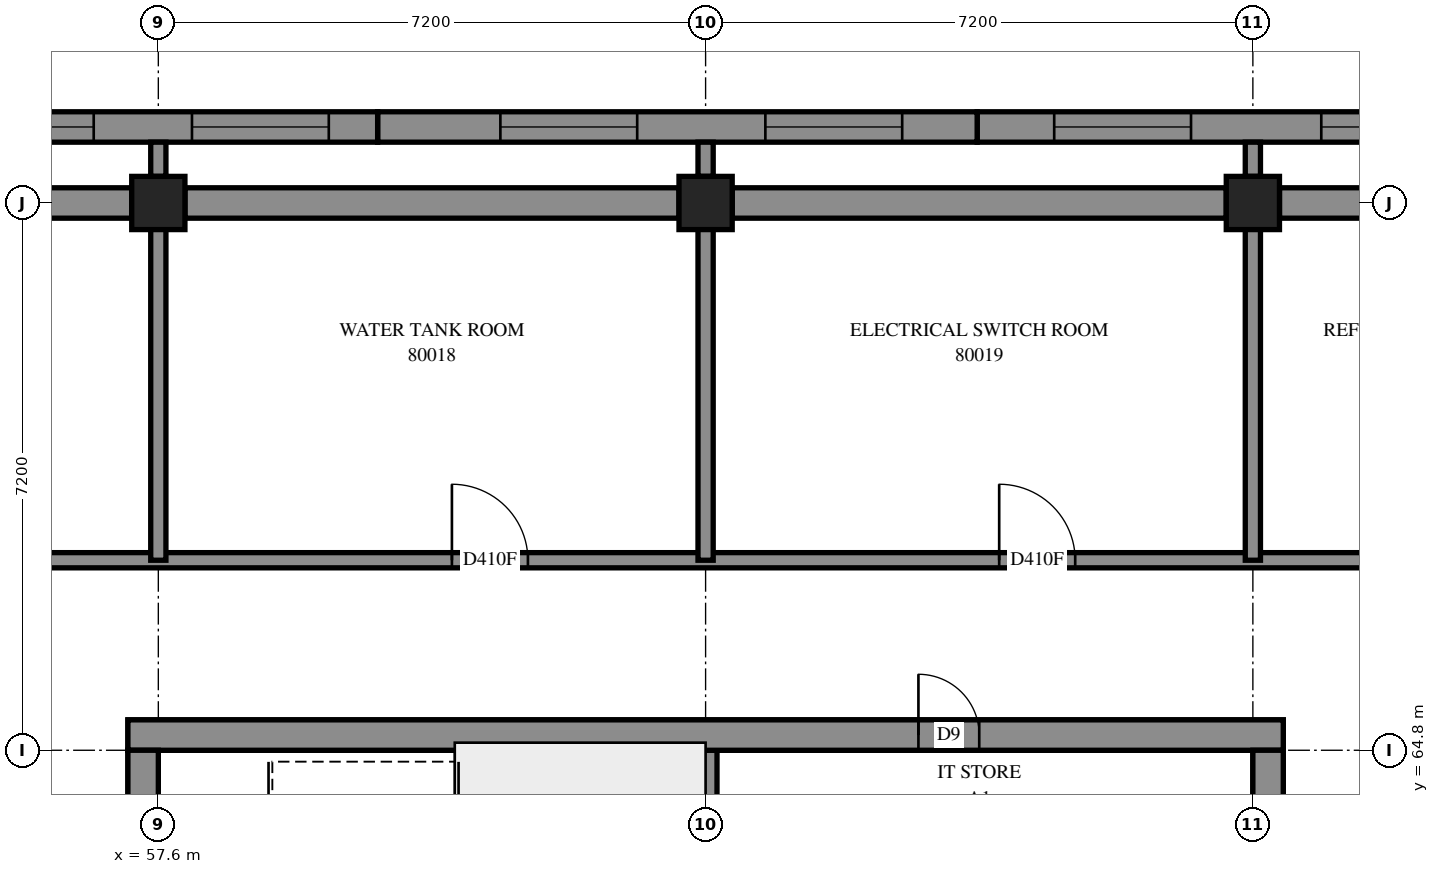
"""IFC4 building model, lengths in metres.
Left out: names, types, materials, properties, quantities, classifications, styles, units other than length and angle.
Written with IfcOpenShell. Run it as: python <this file> out.ifc"""

import sys

from ifc_helpers import new_model, si_unit, direction, frame, frame_2d, origin, origin_2d, place, context, subcontext, project, spatial, polyline, rectangle, outline, extrude, element, fill, save


model = new_model("IFC4")
c1 = context("Model", 3, precision=1e-05, world=origin(), true_north=direction((0.0, 1.0)))
c2 = subcontext(c1, "Body", "Model", "MODEL_VIEW")
j1 = project(units=[si_unit("LENGTHUNIT", "METRE"), si_unit("PLANEANGLEUNIT", "RADIAN")], contexts=[c1])
p1 = place(None, origin())
s1 = spatial("IfcSite", under=j1, at=p1, CompositionType="ELEMENT")
p2 = place(p1, origin())
s2 = spatial("IfcBuilding", under=s1, at=p2, CompositionType="ELEMENT")
p3 = place(p2, frame((0.0, 0.0, 294.4)))
s3 = spatial("IfcBuildingStorey", under=s2, at=p3, CompositionType="ELEMENT", Elevation=294.4)
for number, where, z_axis, x_axis in (
    (1, (57.6, 72.0, 0.0), (0.0, 0.0, 1.0), (1.0, 0.0, 0.0)),
    (2, (64.8, 72.0, 0.0), (0.0, 0.0, 1.0), (1.0, 0.0, 0.0)),
    (3, (72.0, 72.0, 0.0), (0.0, 0.0, 1.0), (1.0, 0.0, 0.0)),
):
    element("IfcColumn", number, at=place(p3, frame(where, z_axis=z_axis, x_axis=x_axis)), inside=s3, PredefinedType="COLUMN", context=c2, shape_type="SweptSolid", body=[
        extrude(rectangle(XDim=0.7, YDim=0.7, at=origin_2d()), origin(), (0.0, 0.0, 1.0), 3.5),
    ])
p4 = place(p3, frame((57.2, 65.0, -0.3), z_axis=(0.0, 0.0, 1.0), x_axis=(1.0, 0.0, 0.0)))
e4 = element("IfcWall", 4, at=p4, inside=s3, PredefinedType="SHEAR", context=c2, shape_type="SweptSolid", body=[
    extrude(outline(polyline([(0.0, 0.0), (15.2, 0.0), (15.2, 3.1), (0.0, 3.1), (0.0, 0.0)])), frame((0.0, 0.2, 0.0), z_axis=(0.0, -1.0, 0.0), x_axis=(1.0, 0.0, 0.0)), (0.0, 0.0, 1.0), 0.4),
])
p5 = place(p4, frame((10.4, 0.0, 0.3)))
e5 = element("IfcOpeningElement", 5, at=p5, cuts=e4, PredefinedType="OPENING", context=c2, shape_type="SweptSolid", body=[
    extrude(rectangle(XDim=0.8, YDim=2.1, at=frame_2d((0.4, 1.05))), frame((0.0, 0.21, 0.0), z_axis=(0.0, -1.0, 0.0), x_axis=(1.0, 0.0, 0.0)), (0.0, 0.0, 1.0), 0.42),
])
p6 = place(p3, frame((57.4, 50.4, -0.3), z_axis=(0.0, 0.0, 1.0), x_axis=(0.0, 1.0, 0.0)))
e6 = element("IfcWall", 6, at=p6, inside=s3, PredefinedType="SHEAR", context=c2, shape_type="SweptSolid", body=[
    extrude(outline(polyline([(0.0, 0.0), (14.4, 0.0), (14.4, 3.1), (0.0, 3.1), (0.0, 0.0)])), frame((0.0, 0.2, 0.0), z_axis=(0.0, -1.0, 0.0), x_axis=(1.0, 0.0, 0.0)), (0.0, 0.0, 1.0), 0.4),
])
p7 = place(p6, frame((11.35, 0.0, 0.3)))
e7 = element("IfcOpeningElement", 7, at=p7, cuts=e6, PredefinedType="OPENING", context=c2, shape_type="SweptSolid", body=[
    extrude(rectangle(XDim=1.1, YDim=2.1, at=frame_2d((0.55, 1.05))), frame((0.0, 0.21, 0.0), z_axis=(0.0, -1.0, 0.0), x_axis=(1.0, 0.0, 0.0)), (0.0, 0.0, 1.0), 0.42),
])
p8 = place(p3, frame((72.2, 50.4, -0.3), z_axis=(0.0, 0.0, 1.0), x_axis=(0.0, 1.0, 0.0)))
e8 = element("IfcWall", 8, at=p8, inside=s3, PredefinedType="SHEAR", context=c2, shape_type="SweptSolid", body=[
    extrude(outline(polyline([(0.0, 0.0), (14.4, 0.0), (14.4, 3.1), (0.0, 3.1), (0.0, 0.0)])), frame((0.0, 0.2, 0.0), z_axis=(0.0, -1.0, 0.0), x_axis=(1.0, 0.0, 0.0)), (0.0, 0.0, 1.0), 0.4),
])
p9 = place(p8, frame((4.55, 0.0, 0.3)))
e9 = element("IfcOpeningElement", 9, at=p9, cuts=e8, PredefinedType="OPENING", context=c2, shape_type="SweptSolid", body=[
    extrude(rectangle(XDim=1.1, YDim=2.1, at=frame_2d((0.55, 1.05))), frame((0.0, 0.21, 0.0), z_axis=(0.0, -1.0, 0.0), x_axis=(1.0, 0.0, 0.0)), (0.0, 0.0, 1.0), 0.42),
])
p10 = place(p8, frame((11.35, 0.0, 0.3)))
e10 = element("IfcOpeningElement", 10, at=p10, cuts=e8, PredefinedType="OPENING", context=c2, shape_type="SweptSolid", body=[
    extrude(rectangle(XDim=1.1, YDim=2.1, at=frame_2d((0.55, 1.05))), frame((0.0, 0.21, 0.0), z_axis=(0.0, -1.0, 0.0), x_axis=(1.0, 0.0, 0.0)), (0.0, 0.0, 1.0), 0.42),
])
p11 = place(p3, frame((64.8, 60.6, 0.0), z_axis=(0.0, 0.0, 1.0), x_axis=(0.0, 1.0, 0.0)))
e11 = element("IfcWall", 11, at=p11, inside=s3, PredefinedType="SOLIDWALL", context=c2, shape_type="SweptSolid", body=[
    extrude(outline(polyline([(0.0, 0.0), (4.2, 0.0), (4.2, 3.5), (0.0, 3.5), (0.0, 0.0)])), frame((0.0, 0.15, 0.0), z_axis=(0.0, -1.0, 0.0), x_axis=(1.0, 0.0, 0.0)), (0.0, 0.0, 1.0), 0.3),
])
p12 = place(p3, frame((76.29, 73.0, 0.0), z_axis=(0.0, 0.0, 1.0), x_axis=(-1.0, 0.0, 0.0)))
e12 = element("IfcWall", 12, at=p12, inside=s3, PredefinedType="SOLIDWALL", context=c2, shape_type="SweptSolid", body=[
    extrude(outline(polyline([(0.03, -0.2), (7.918, -0.2), (7.918, 0.2), (-0.03, 0.2), (0.03, -0.2)])), origin(), (0.0, 0.0, 1.0), 3.5),
])
p13 = place(p12, frame((1.591, 0.0, 0.7)))
e13 = element("IfcOpeningElement", 13, at=p13, cuts=e12, PredefinedType="OPENING", context=c2, shape_type="SweptSolid", body=[
    extrude(rectangle(XDim=1.8, YDim=2.2, at=frame_2d((0.9, 1.1))), frame((0.0, 0.21, 0.0), z_axis=(0.0, -1.0, 0.0), x_axis=(1.0, 0.0, 0.0)), (0.0, 0.0, 1.0), 0.42),
])
p14 = place(p12, frame((5.104, 0.0, 0.7)))
e14 = element("IfcOpeningElement", 14, at=p14, cuts=e12, PredefinedType="OPENING", context=c2, shape_type="SweptSolid", body=[
    extrude(rectangle(XDim=1.8, YDim=2.2, at=frame_2d((0.9, 1.1))), frame((0.0, 0.21, 0.0), z_axis=(0.0, -1.0, 0.0), x_axis=(1.0, 0.0, 0.0)), (0.0, 0.0, 1.0), 0.42),
])
p15 = place(p3, frame((68.373, 73.0, 0.0), z_axis=(0.0, 0.0, 1.0), x_axis=(-1.0, 0.0, 0.0)))
e15 = element("IfcWall", 15, at=p15, inside=s3, PredefinedType="SOLIDWALL", context=c2, shape_type="SweptSolid", body=[
    extrude(outline(polyline([(0.0, -0.2), (7.887, -0.2), (7.887, 0.2), (0.0, 0.2), (0.0, -0.2)])), origin(), (0.0, 0.0, 1.0), 3.5),
])
p16 = place(p15, frame((0.986, 0.0, 0.7)))
e16 = element("IfcOpeningElement", 16, at=p16, cuts=e15, PredefinedType="OPENING", context=c2, shape_type="SweptSolid", body=[
    extrude(rectangle(XDim=1.8, YDim=2.2, at=frame_2d((0.9, 1.1))), frame((0.0, 0.21, 0.0), z_axis=(0.0, -1.0, 0.0), x_axis=(1.0, 0.0, 0.0)), (0.0, 0.0, 1.0), 0.42),
])
p17 = place(p15, frame((4.473, 0.0, 0.7)))
e17 = element("IfcOpeningElement", 17, at=p17, cuts=e15, PredefinedType="OPENING", context=c2, shape_type="SweptSolid", body=[
    extrude(rectangle(XDim=1.8, YDim=2.2, at=frame_2d((0.9, 1.1))), frame((0.0, 0.21, 0.0), z_axis=(0.0, -1.0, 0.0), x_axis=(1.0, 0.0, 0.0)), (0.0, 0.0, 1.0), 0.42),
])
p18 = place(p3, frame((60.485, 73.0, 0.0), z_axis=(0.0, 0.0, 1.0), x_axis=(-1.0, 0.0, 0.0)))
e18 = element("IfcWall", 18, at=p18, inside=s3, PredefinedType="SOLIDWALL", context=c2, shape_type="SweptSolid", body=[
    extrude(outline(polyline([(0.0, -0.2), (7.887, -0.2), (7.887, 0.2), (0.0, 0.2), (0.0, -0.2)])), origin(), (0.0, 0.0, 1.0), 3.5),
])
p19 = place(p18, frame((0.643, 0.0, 0.7)))
e19 = element("IfcOpeningElement", 19, at=p19, cuts=e18, PredefinedType="OPENING", context=c2, shape_type="SweptSolid", body=[
    extrude(rectangle(XDim=1.8, YDim=2.2, at=frame_2d((0.9, 1.1))), frame((0.0, 0.21, 0.0), z_axis=(0.0, -1.0, 0.0), x_axis=(1.0, 0.0, 0.0)), (0.0, 0.0, 1.0), 0.42),
])
p20 = place(p18, frame((3.735, 0.0, 0.7)))
e20 = element("IfcOpeningElement", 20, at=p20, cuts=e18, PredefinedType="OPENING", context=c2, shape_type="SweptSolid", body=[
    extrude(rectangle(XDim=1.8, YDim=2.2, at=frame_2d((0.9, 1.1))), frame((0.0, 0.21, 0.0), z_axis=(0.0, -1.0, 0.0), x_axis=(1.0, 0.0, 0.0)), (0.0, 0.0, 1.0), 0.42),
])
p21 = place(p3, frame((55.102, 67.3, 0.0), z_axis=(0.0, 0.0, 1.0), x_axis=(1.0, 0.0, 0.0)))
e21 = element("IfcWall", 21, at=p21, inside=s3, PredefinedType="PARTITIONING", context=c2, shape_type="SweptSolid", body=[
    extrude(rectangle(XDim=19.398, YDim=0.2, at=frame_2d((9.699, 0.0))), origin(), (0.0, 0.0, 1.0), 3.5),
])
p22 = place(p21, frame((6.361, 0.0, 0.0)))
e22 = element("IfcOpeningElement", 22, at=p22, cuts=e21, PredefinedType="OPENING", context=c2, shape_type="SweptSolid", body=[
    extrude(rectangle(XDim=1.0, YDim=2.1, at=frame_2d((0.5, 1.05))), frame((0.0, 0.11, 0.0), z_axis=(0.0, -1.0, 0.0), x_axis=(1.0, 0.0, 0.0)), (0.0, 0.0, 1.0), 0.22),
])
p23 = place(p21, frame((13.56, 0.0, 0.0)))
e23 = element("IfcOpeningElement", 23, at=p23, cuts=e21, PredefinedType="OPENING", context=c2, shape_type="SweptSolid", body=[
    extrude(rectangle(XDim=1.0, YDim=2.1, at=frame_2d((0.5, 1.05))), frame((0.0, 0.11, 0.0), z_axis=(0.0, -1.0, 0.0), x_axis=(1.0, 0.0, 0.0)), (0.0, 0.0, 1.0), 0.22),
])
for number, where, z_axis, x_axis in (
    (24, (57.6, 67.3, 0.0), (0.0, 0.0, 1.0), (0.0, 1.0, 0.0)),
    (25, (64.8, 67.3, 0.0), (0.0, 0.0, 1.0), (0.0, 1.0, 0.0)),
    (26, (72.0, 67.3, 0.0), (0.0, 0.0, 1.0), (0.0, 1.0, 0.0)),
):
    element("IfcWall", number, at=place(p3, frame(where, z_axis=z_axis, x_axis=x_axis)), inside=s3, PredefinedType="PARTITIONING", context=c2, shape_type="SweptSolid", body=[
        extrude(rectangle(XDim=5.05, YDim=0.2, at=frame_2d((2.525, 0.0))), origin(), (0.0, 0.0, 1.0), 3.5),
    ])
for number, where, z_axis, x_axis in (
    (27, (57.6, 72.35, 0.0), (0.0, 0.0, 1.0), (0.0, 1.0, 0.0)),
    (28, (64.8, 72.35, 0.0), (0.0, 0.0, 1.0), (0.0, 1.0, 0.0)),
    (29, (72.0, 72.35, 0.0), (0.0, 0.0, 1.0), (0.0, 1.0, 0.0)),
):
    element("IfcWall", number, at=place(p3, frame(where, z_axis=z_axis, x_axis=x_axis)), inside=s3, PredefinedType="PARTITIONING", context=c2, shape_type="SweptSolid", body=[
        extrude(outline(polyline([(0.0, -0.1), (0.45, -0.1), (0.45, 0.1), (0.0, 0.1), (0.0, -0.1)])), origin(), (0.0, 0.0, 1.0), 3.5),
    ])
p24 = place(p13, origin())
e30 = element("IfcWindow", 30, at=p24, inside=s3, PartitioningType="SINGLE_PANEL", PredefinedType="WINDOW", context=c2, shape_type="SweptSolid", body=[
    extrude(rectangle(XDim=1.8, YDim=2.2, at=frame_2d((0.9, 1.1))), frame((0.0, 0.08, 0.0), z_axis=(0.0, -1.0, 0.0), x_axis=(1.0, 0.0, 0.0)), (0.0, 0.0, 1.0), 0.06),
])
fill(e13, e30)
p25 = place(p14, origin())
e31 = element("IfcWindow", 31, at=p25, inside=s3, PartitioningType="SINGLE_PANEL", PredefinedType="WINDOW", context=c2, shape_type="SweptSolid", body=[
    extrude(rectangle(XDim=1.8, YDim=2.2, at=frame_2d((0.9, 1.1))), frame((0.0, 0.08, 0.0), z_axis=(0.0, -1.0, 0.0), x_axis=(1.0, 0.0, 0.0)), (0.0, 0.0, 1.0), 0.06),
])
fill(e14, e31)
p26 = place(p16, origin())
e32 = element("IfcWindow", 32, at=p26, inside=s3, PartitioningType="SINGLE_PANEL", PredefinedType="WINDOW", context=c2, shape_type="SweptSolid", body=[
    extrude(rectangle(XDim=1.8, YDim=2.2, at=frame_2d((0.9, 1.1))), frame((0.0, 0.08, 0.0), z_axis=(0.0, -1.0, 0.0), x_axis=(1.0, 0.0, 0.0)), (0.0, 0.0, 1.0), 0.06),
])
fill(e16, e32)
p27 = place(p17, origin())
e33 = element("IfcWindow", 33, at=p27, inside=s3, PartitioningType="SINGLE_PANEL", PredefinedType="WINDOW", context=c2, shape_type="SweptSolid", body=[
    extrude(rectangle(XDim=1.8, YDim=2.2, at=frame_2d((0.9, 1.1))), frame((0.0, 0.08, 0.0), z_axis=(0.0, -1.0, 0.0), x_axis=(1.0, 0.0, 0.0)), (0.0, 0.0, 1.0), 0.06),
])
fill(e17, e33)
p28 = place(p19, origin())
e34 = element("IfcWindow", 34, at=p28, inside=s3, PartitioningType="SINGLE_PANEL", PredefinedType="WINDOW", context=c2, shape_type="SweptSolid", body=[
    extrude(rectangle(XDim=1.8, YDim=2.2, at=frame_2d((0.9, 1.1))), frame((0.0, 0.08, 0.0), z_axis=(0.0, -1.0, 0.0), x_axis=(1.0, 0.0, 0.0)), (0.0, 0.0, 1.0), 0.06),
])
fill(e19, e34)
p29 = place(p20, origin())
e35 = element("IfcWindow", 35, at=p29, inside=s3, PartitioningType="SINGLE_PANEL", PredefinedType="WINDOW", context=c2, shape_type="SweptSolid", body=[
    extrude(rectangle(XDim=1.8, YDim=2.2, at=frame_2d((0.9, 1.1))), frame((0.0, 0.08, 0.0), z_axis=(0.0, -1.0, 0.0), x_axis=(1.0, 0.0, 0.0)), (0.0, 0.0, 1.0), 0.06),
])
fill(e20, e35)
p30 = place(p5, origin())
e36 = element("IfcDoor", 36, at=p30, inside=s3, OperationType="SINGLE_SWING_RIGHT", PredefinedType="DOOR", context=c2, shape_type="SweptSolid", body=[
    extrude(rectangle(XDim=0.8, YDim=2.1, at=frame_2d((0.4, 1.05))), frame((0.0, 0.025, 0.0), z_axis=(0.0, -1.0, 0.0), x_axis=(1.0, 0.0, 0.0)), (0.0, 0.0, 1.0), 0.05),
])
fill(e5, e36)
p31 = place(p22, origin())
e37 = element("IfcDoor", 37, at=p31, inside=s3, OperationType="SINGLE_SWING_RIGHT", PredefinedType="DOOR", context=c2, shape_type="SweptSolid", body=[
    extrude(rectangle(XDim=1.0, YDim=2.1, at=frame_2d((0.5, 1.05))), frame((0.0, 0.025, 0.0), z_axis=(0.0, -1.0, 0.0), x_axis=(1.0, 0.0, 0.0)), (0.0, 0.0, 1.0), 0.05),
])
fill(e22, e37)
p32 = place(p23, origin())
e38 = element("IfcDoor", 38, at=p32, inside=s3, OperationType="SINGLE_SWING_RIGHT", PredefinedType="DOOR", context=c2, shape_type="SweptSolid", body=[
    extrude(rectangle(XDim=1.0, YDim=2.1, at=frame_2d((0.5, 1.05))), frame((0.0, 0.025, 0.0), z_axis=(0.0, -1.0, 0.0), x_axis=(1.0, 0.0, 0.0)), (0.0, 0.0, 1.0), 0.05),
])
fill(e23, e38)
save(model, sys.argv[1])
